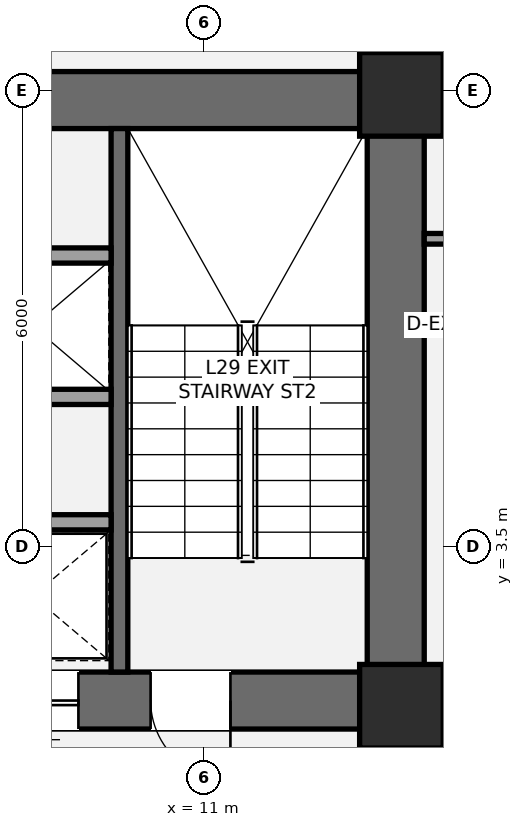
"""IFC4 building model, lengths in metres.
Left out: names, types, materials, properties, quantities, classifications, styles, units other than length and angle.
Written with IfcOpenShell. Run it as: python <this file> out.ifc"""

import sys

from ifc_helpers import new_model, si_unit, direction, frame, frame_2d, origin, origin_2d, place, context, subcontext, project, spatial, rectangle, extrude, element, fill, save


model = new_model("IFC4")
c1 = context("Model", 3, precision=1e-05, world=origin(), true_north=direction((0.0, 1.0)))
c2 = subcontext(c1, "Body", "Model", "MODEL_VIEW")
j1 = project(units=[si_unit("LENGTHUNIT", "METRE"), si_unit("PLANEANGLEUNIT", "RADIAN")], contexts=[c1])
p1 = place(None, origin())
s1 = spatial("IfcSite", under=j1, at=p1, CompositionType="ELEMENT")
p2 = place(p1, origin())
s2 = spatial("IfcBuilding", under=s1, at=p2, CompositionType="ELEMENT")
p3 = place(p2, frame((0.0, 0.0, 110.6)))
s3 = spatial("IfcBuildingStorey", under=s2, at=p3, CompositionType="ELEMENT", Elevation=110.6)
p4 = place(p3, frame((13.525, 1.1, 0.0), z_axis=(0.0, 0.0, 1.0), x_axis=(0.0, 1.0, 0.0)))
e1 = element("IfcWall", 1, at=p4, inside=s3, PredefinedType="SHEAR", context=c2, shape_type="SweptSolid", body=[
    extrude(rectangle(XDim=8.65, YDim=0.75, at=frame_2d((4.325, 0.0))), origin(), (0.0, 0.0, 1.0), 3.5),
])
p5 = place(p3, frame((4.425, 9.375, 0.0), z_axis=(0.0, 0.0, 1.0), x_axis=(1.0, 0.0, 0.0)))
e2 = element("IfcWall", 2, at=p5, inside=s3, PredefinedType="SHEAR", context=c2, shape_type="SweptSolid", body=[
    extrude(rectangle(XDim=9.475, YDim=0.75, at=frame_2d((4.737, 0.0))), origin(), (0.0, 0.0, 1.0), 3.5),
])
p6 = place(p3, frame((13.9, 1.475, 0.0), z_axis=(0.0, 0.0, 1.0), x_axis=(-1.0, 0.0, 0.0)))
e3 = element("IfcWall", 3, at=p6, inside=s3, PredefinedType="SHEAR", context=c2, shape_type="SweptSolid", body=[
    extrude(rectangle(XDim=9.075, YDim=0.75, at=frame_2d((4.538, 0.0))), origin(), (0.0, 0.0, 1.0), 3.5),
])
p7 = place(p6, frame((2.55, 0.0, 0.0)))
e4 = element("IfcOpeningElement", 4, at=p7, cuts=e3, PredefinedType="OPENING", context=c2, shape_type="SweptSolid", body=[
    extrude(rectangle(XDim=1.05, YDim=2.15, at=frame_2d((0.525, 1.075))), frame((0.0, 0.385, 0.0), z_axis=(0.0, -1.0, 0.0), x_axis=(1.0, 0.0, 0.0)), (0.0, 0.0, 1.0), 0.77),
])
p8 = place(p6, frame((4.55, 0.0, 0.0)))
e5 = element("IfcOpeningElement", 5, at=p8, cuts=e3, PredefinedType="OPENING", context=c2, shape_type="SweptSolid", body=[
    extrude(rectangle(XDim=1.1, YDim=2.2, at=frame_2d((0.55, 1.1))), frame((0.0, 0.385, 0.0), z_axis=(0.0, -1.0, 0.0), x_axis=(1.0, 0.0, 0.0)), (0.0, 0.0, 1.0), 0.77),
])
p9 = place(p3, frame((9.89, 1.85, 0.0), z_axis=(0.0, 0.0, 1.0), x_axis=(0.0, 1.0, 0.0)))
e6 = element("IfcWall", 6, at=p9, inside=s3, PredefinedType="SHEAR", context=c2, shape_type="SweptSolid", body=[
    extrude(rectangle(XDim=7.15, YDim=0.22, at=frame_2d((3.575, 0.0))), origin(), (0.0, 0.0, 1.0), 3.5),
])
for number, where, z_axis, x_axis in (
    (7, (13.6, 1.4, 0.0), (0.0, 0.0, 1.0), (1.0, 0.0, 0.0)),
    (8, (13.6, 9.45, 0.0), (0.0, 0.0, 1.0), (1.0, 0.0, 0.0)),
):
    element("IfcColumn", number, at=place(p3, frame(where, z_axis=z_axis, x_axis=x_axis)), inside=s3, PredefinedType="COLUMN", context=c2, shape_type="SweptSolid", body=[
        extrude(rectangle(XDim=1.1, YDim=1.1, at=origin_2d()), origin(), (0.0, 0.0, 1.0), 3.5),
    ])
p10 = place(p3, frame((13.45, -2.15, 0.0), z_axis=(0.0, 0.0, 1.0), x_axis=(0.0, 1.0, 0.0)))
e9 = element("IfcWall", 9, at=p10, inside=s3, PredefinedType="PARTITIONING", context=c2, shape_type="SweptSolid", body=[
    extrude(rectangle(XDim=3.3, YDim=0.165, at=frame_2d((1.65, 0.0))), origin(), (0.0, 0.0, 1.0), 2.763),
])
p11 = place(p10, frame((1.15, 0.0, 0.0)))
e10 = element("IfcOpeningElement", 10, at=p11, cuts=e9, PredefinedType="OPENING", context=c2, shape_type="SweptSolid", body=[
    extrude(rectangle(XDim=1.05, YDim=2.15, at=frame_2d((0.525, 1.075))), frame((0.0, 0.093, 0.0), z_axis=(0.0, -1.0, 0.0), x_axis=(1.0, 0.0, 0.0)), (0.0, 0.0, 1.0), 0.185),
])
p12 = place(p3, frame((5.575, 3.82, 0.0), z_axis=(0.0, 0.0, 1.0), x_axis=(1.0, 0.0, 0.0)))
e11 = element("IfcWall", 11, at=p12, inside=s3, PredefinedType="SOLIDWALL", context=c2, shape_type="SweptSolid", body=[
    extrude(rectangle(XDim=4.205, YDim=0.2, at=frame_2d((2.103, 0.0))), origin(), (0.0, 0.0, 1.0), 3.31),
])
p13 = place(p12, frame((0.65, 0.0, 0.0)))
e12 = element("IfcOpeningElement", 12, at=p13, cuts=e11, PredefinedType="OPENING", context=c2, shape_type="SweptSolid", body=[
    extrude(rectangle(XDim=1.2, YDim=2.2, at=frame_2d((0.6, 1.1))), frame((0.0, 0.11, 0.0), z_axis=(0.0, -1.0, 0.0), x_axis=(1.0, 0.0, 0.0)), (0.0, 0.0, 1.0), 0.22),
])
for number, where, z_axis, x_axis in (
    (13, (5.575, 5.47, 0.0), (0.0, 0.0, 1.0), (1.0, 0.0, 0.0)),
    (14, (5.575, 7.33, 0.0), (0.0, 0.0, 1.0), (1.0, 0.0, 0.0)),
):
    element("IfcWall", number, at=place(p3, frame(where, z_axis=z_axis, x_axis=x_axis)), inside=s3, PredefinedType="SOLIDWALL", context=c2, shape_type="SweptSolid", body=[
        extrude(rectangle(XDim=4.205, YDim=0.2, at=frame_2d((2.103, 0.0))), origin(), (0.0, 0.0, 1.0), 3.31),
    ])
p14 = place(p3, frame((13.9, 7.55, 0.0), z_axis=(0.0, 0.0, 1.0), x_axis=(1.0, 0.0, 0.0)))
e15 = element("IfcWall", 15, at=p14, inside=s3, PredefinedType="PARTITIONING", context=c2, shape_type="SweptSolid", body=[
    extrude(rectangle(XDim=2.5, YDim=0.14, at=frame_2d((1.25, 0.0))), origin(), (0.0, 0.0, 1.0), 2.763),
])
p15 = place(p14, frame((0.32, 0.0, 0.0)))
e16 = element("IfcOpeningElement", 16, at=p15, cuts=e15, PredefinedType="OPENING", context=c2, shape_type="SweptSolid", body=[
    extrude(rectangle(XDim=0.92, YDim=2.15, at=frame_2d((0.46, 1.075))), frame((0.0, 0.08, 0.0), z_axis=(0.0, -1.0, 0.0), x_axis=(1.0, 0.0, 0.0)), (0.0, 0.0, 1.0), 0.16),
])
p16 = place(p7, origin())
e17 = element("IfcDoor", 17, at=p16, inside=s3, OperationType="SINGLE_SWING_LEFT", PredefinedType="DOOR", context=c2, shape_type="SweptSolid", body=[
    extrude(rectangle(XDim=1.05, YDim=2.15, at=frame_2d((0.525, 1.075))), frame((0.0, 0.025, 0.0), z_axis=(0.0, -1.0, 0.0), x_axis=(1.0, 0.0, 0.0)), (0.0, 0.0, 1.0), 0.05),
])
fill(e4, e17)
p17 = place(p8, origin())
e18 = element("IfcDoor", 18, at=p17, inside=s3, OperationType="SLIDING_TO_LEFT", PredefinedType="DOOR", context=c2, shape_type="SweptSolid", body=[
    extrude(rectangle(XDim=1.1, YDim=2.2, at=frame_2d((0.55, 1.1))), frame((0.0, 0.025, 0.0), z_axis=(0.0, -1.0, 0.0), x_axis=(1.0, 0.0, 0.0)), (0.0, 0.0, 1.0), 0.05),
])
fill(e5, e18)
save(model, sys.argv[1])
